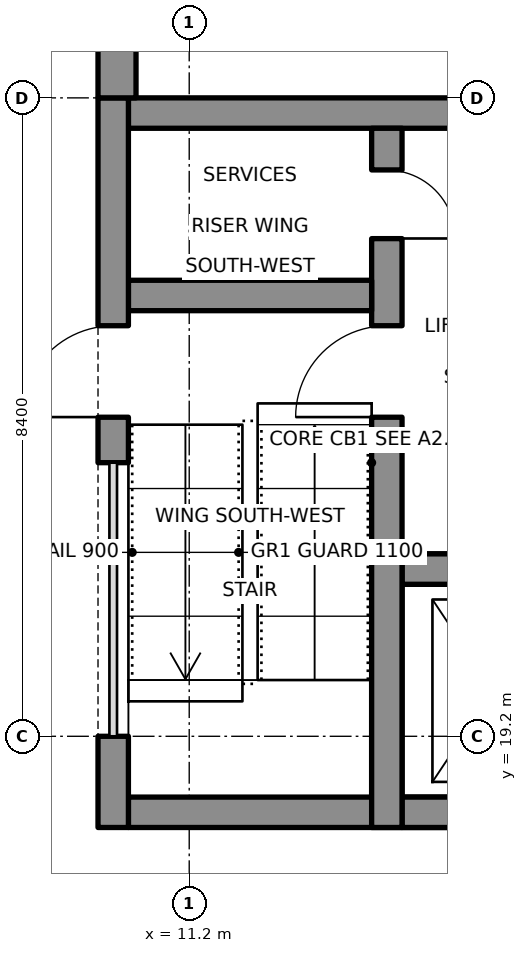
"""IFC4 building model, lengths in metres.
Left out: names, types, materials, properties, quantities, classifications, styles, units other than length and angle.
Written with IfcOpenShell. Run it as: python <this file> out.ifc"""

import sys

from ifc_helpers import new_model, si_unit, direction, frame, frame_2d, origin, place, context, subcontext, project, spatial, rectangle, extrude, element, fill, save


model = new_model("IFC4")
c1 = context("Model", 3, precision=1e-05, world=origin(), true_north=direction((0.0, 1.0)))
c2 = subcontext(c1, "Body", "Model", "MODEL_VIEW")
j1 = project(units=[si_unit("LENGTHUNIT", "METRE"), si_unit("PLANEANGLEUNIT", "RADIAN")], contexts=[c1])
p1 = place(None, origin())
s1 = spatial("IfcSite", under=j1, at=p1, CompositionType="ELEMENT")
p2 = place(p1, origin())
s2 = spatial("IfcBuilding", under=s1, at=p2, CompositionType="ELEMENT")
p3 = place(p2, origin())
s3 = spatial("IfcBuildingStorey", under=s2, at=p3, CompositionType="ELEMENT", Elevation=0.0)
p4 = place(p3, frame((10.25, 27.6, 0.0), z_axis=(0.0, 0.0, 1.0), x_axis=(0.0, 1.0, 0.0)))
e1 = element("IfcWall", 1, at=p4, inside=s3, PredefinedType="SOLIDWALL", context=c2, shape_type="SweptSolid", body=[
    extrude(rectangle(XDim=16.8, YDim=0.5, at=frame_2d((8.4, 0.0))), origin(), (0.0, 0.0, 1.0), 4.4),
])
p5 = place(p4, frame((3.3, 0.0, 0.0)))
e2 = element("IfcOpeningElement", 2, at=p5, cuts=e1, PredefinedType="OPENING", context=c2, shape_type="SweptSolid", body=[
    extrude(rectangle(XDim=1.8, YDim=2.4, at=frame_2d((0.9, 1.2))), frame((0.0, 0.26, 0.0), z_axis=(0.0, -1.0, 0.0), x_axis=(1.0, 0.0, 0.0)), (0.0, 0.0, 1.0), 0.52),
])
p6 = place(p4, frame((11.7, 0.0, 0.0)))
e3 = element("IfcOpeningElement", 3, at=p6, cuts=e1, PredefinedType="OPENING", context=c2, shape_type="SweptSolid", body=[
    extrude(rectangle(XDim=1.8, YDim=2.4, at=frame_2d((0.9, 1.2))), frame((0.0, 0.26, 0.0), z_axis=(0.0, -1.0, 0.0), x_axis=(1.0, 0.0, 0.0)), (0.0, 0.0, 1.0), 0.52),
])
p7 = place(p3, frame((10.2, 18.0, 0.0), z_axis=(0.0, 0.0, 1.0), x_axis=(0.0, 1.0, 0.0)))
e4 = element("IfcWall", 4, at=p7, inside=s3, PredefinedType="SHEAR", context=c2, shape_type="SweptSolid", body=[
    extrude(rectangle(XDim=1.2, YDim=0.4, at=frame_2d((0.6, 0.0))), origin(), (0.0, 0.0, 1.0), 4.4),
])
p8 = place(p3, frame((10.2, 22.8, 0.0), z_axis=(0.0, 0.0, 1.0), x_axis=(0.0, 1.0, 0.0)))
e5 = element("IfcWall", 5, at=p8, inside=s3, PredefinedType="SHEAR", context=c2, shape_type="SweptSolid", body=[
    extrude(rectangle(XDim=4.8, YDim=0.4, at=frame_2d((2.4, 0.0))), origin(), (0.0, 0.0, 1.0), 4.4),
])
p9 = place(p8, frame((0.6, 0.0, 0.0)))
e6 = element("IfcOpeningElement", 6, at=p9, cuts=e5, PredefinedType="OPENING", context=c2, shape_type="SweptSolid", body=[
    extrude(rectangle(XDim=1.2, YDim=2.1, at=frame_2d((0.6, 1.05))), frame((0.0, 0.21, 0.0), z_axis=(0.0, -1.0, 0.0), x_axis=(1.0, 0.0, 0.0)), (0.0, 0.0, 1.0), 0.42),
])
p10 = place(p3, frame((10.4, 18.2, 0.0), z_axis=(0.0, 0.0, 1.0), x_axis=(1.0, 0.0, 0.0)))
e7 = element("IfcWall", 7, at=p10, inside=s3, PredefinedType="SHEAR", context=c2, shape_type="SweptSolid", body=[
    extrude(rectangle(XDim=6.4, YDim=0.4, at=frame_2d((3.2, 0.0))), origin(), (0.0, 0.0, 1.0), 4.4),
])
p11 = place(p3, frame((10.4, 27.4, 0.0), z_axis=(0.0, 0.0, 1.0), x_axis=(1.0, 0.0, 0.0)))
e8 = element("IfcWall", 8, at=p11, inside=s3, PredefinedType="SHEAR", context=c2, shape_type="SweptSolid", body=[
    extrude(rectangle(XDim=6.4, YDim=0.4, at=frame_2d((3.2, 0.0))), origin(), (0.0, 0.0, 1.0), 4.4),
])
p12 = place(p11, frame((4.4, 0.0, 0.0)))
e9 = element("IfcOpeningElement", 9, at=p12, cuts=e8, PredefinedType="OPENING", context=c2, shape_type="SweptSolid", body=[
    extrude(rectangle(XDim=1.2, YDim=2.1, at=frame_2d((0.6, 1.05))), frame((0.0, 0.21, 0.0), z_axis=(0.0, -1.0, 0.0), x_axis=(1.0, 0.0, 0.0)), (0.0, 0.0, 1.0), 0.42),
])
p13 = place(p3, frame((13.8, 18.4, 0.0), z_axis=(0.0, 0.0, 1.0), x_axis=(0.0, 1.0, 0.0)))
e10 = element("IfcWall", 10, at=p13, inside=s3, PredefinedType="SHEAR", context=c2, shape_type="SweptSolid", body=[
    extrude(rectangle(XDim=8.8, YDim=0.4, at=frame_2d((4.4, 0.0))), origin(), (0.0, 0.0, 1.0), 4.4),
])
p14 = place(p13, frame((5.0, 0.0, 0.0)))
e11 = element("IfcOpeningElement", 11, at=p14, cuts=e10, PredefinedType="OPENING", context=c2, shape_type="SweptSolid", body=[
    extrude(rectangle(XDim=1.2, YDim=2.1, at=frame_2d((0.6, 1.05))), frame((0.0, 0.21, 0.0), z_axis=(0.0, -1.0, 0.0), x_axis=(1.0, 0.0, 0.0)), (0.0, 0.0, 1.0), 0.42),
])
p15 = place(p13, frame((7.35, 0.0, 0.0)))
e12 = element("IfcOpeningElement", 12, at=p15, cuts=e10, PredefinedType="OPENING", context=c2, shape_type="SweptSolid", body=[
    extrude(rectangle(XDim=0.9, YDim=2.1, at=frame_2d((0.45, 1.05))), frame((0.0, 0.21, 0.0), z_axis=(0.0, -1.0, 0.0), x_axis=(1.0, 0.0, 0.0)), (0.0, 0.0, 1.0), 0.42),
])
p16 = place(p3, frame((10.4, 25.0, 0.0), z_axis=(0.0, 0.0, 1.0), x_axis=(1.0, 0.0, 0.0)))
e13 = element("IfcWall", 13, at=p16, inside=s3, PredefinedType="SHEAR", context=c2, shape_type="SweptSolid", body=[
    extrude(rectangle(XDim=3.2, YDim=0.4, at=frame_2d((1.6, 0.0))), origin(), (0.0, 0.0, 1.0), 4.4),
])
p17 = place(p3, frame((14.0, 21.4, 0.0), z_axis=(0.0, 0.0, 1.0), x_axis=(1.0, 0.0, 0.0)))
e14 = element("IfcWall", 14, at=p17, inside=s3, PredefinedType="SHEAR", context=c2, shape_type="SweptSolid", body=[
    extrude(rectangle(XDim=2.8, YDim=0.4, at=frame_2d((1.4, 0.0))), origin(), (0.0, 0.0, 1.0), 4.4),
])
p18 = place(p17, frame((0.65, 0.0, 0.0)))
e15 = element("IfcOpeningElement", 15, at=p18, cuts=e14, PredefinedType="OPENING", context=c2, shape_type="SweptSolid", body=[
    extrude(rectangle(XDim=1.1, YDim=2.1, at=frame_2d((0.55, 1.05))), frame((0.0, 0.21, 0.0), z_axis=(0.0, -1.0, 0.0), x_axis=(1.0, 0.0, 0.0)), (0.0, 0.0, 1.0), 0.42),
])
p19 = place(p3, frame((13.8, 18.0, -1.5), z_axis=(0.0, 0.0, 1.0), x_axis=(0.0, 1.0, 0.0)))
e16 = element("IfcWall", 16, at=p19, inside=s3, PredefinedType="SHEAR", context=c2, shape_type="SweptSolid", body=[
    extrude(rectangle(XDim=3.6, YDim=0.4, at=frame_2d((1.8, 0.0))), origin(), (0.0, 0.0, 1.0), 1.5),
])
for number, where, z_axis, x_axis in (
    (17, (14.0, 18.2, -1.5), (0.0, 0.0, 1.0), (1.0, 0.0, 0.0)),
    (18, (14.0, 21.4, -1.5), (0.0, 0.0, 1.0), (1.0, 0.0, 0.0)),
):
    element("IfcWall", number, at=place(p3, frame(where, z_axis=z_axis, x_axis=x_axis)), inside=s3, PredefinedType="SHEAR", context=c2, shape_type="SweptSolid", body=[
        extrude(rectangle(XDim=2.4, YDim=0.4, at=frame_2d((1.2, 0.0))), origin(), (0.0, 0.0, 1.0), 1.5),
    ])
p20 = place(p9, origin())
e19 = element("IfcDoor", 19, at=p20, inside=s3, OperationType="SINGLE_SWING_LEFT", PredefinedType="DOOR", context=c2, shape_type="SweptSolid", body=[
    extrude(rectangle(XDim=1.2, YDim=2.1, at=frame_2d((0.6, 1.05))), frame((0.0, 0.025, 0.0), z_axis=(0.0, -1.0, 0.0), x_axis=(1.0, 0.0, 0.0)), (0.0, 0.0, 1.0), 0.05),
])
fill(e6, e19)
p21 = place(p14, origin())
e20 = element("IfcDoor", 20, at=p21, inside=s3, OperationType="SINGLE_SWING_LEFT", PredefinedType="DOOR", context=c2, shape_type="SweptSolid", body=[
    extrude(rectangle(XDim=1.2, YDim=2.1, at=frame_2d((0.6, 1.05))), frame((0.0, 0.025, 0.0), z_axis=(0.0, -1.0, 0.0), x_axis=(1.0, 0.0, 0.0)), (0.0, 0.0, 1.0), 0.05),
])
fill(e11, e20)
p22 = place(p15, origin())
e21 = element("IfcDoor", 21, at=p22, inside=s3, OperationType="SINGLE_SWING_LEFT", PredefinedType="DOOR", context=c2, shape_type="SweptSolid", body=[
    extrude(rectangle(XDim=0.9, YDim=2.1, at=frame_2d((0.45, 1.05))), frame((0.0, 0.025, 0.0), z_axis=(0.0, -1.0, 0.0), x_axis=(1.0, 0.0, 0.0)), (0.0, 0.0, 1.0), 0.05),
])
fill(e12, e21)
save(model, sys.argv[1])
